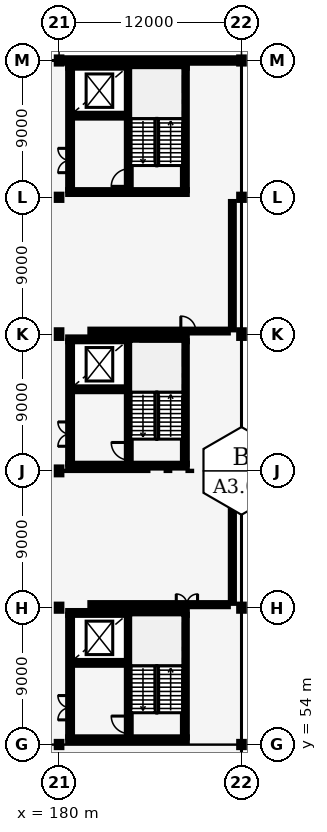
"""IFC4 building model, lengths in metres.
Left out: names, types, materials, properties, quantities, classifications, styles, units other than length and angle.
Written with IfcOpenShell. Run it as: python <this file> out.ifc"""

import sys

from ifc_helpers import new_model, si_unit, direction, frame, frame_2d, origin, origin_2d, place, context, subcontext, project, spatial, rectangle, i_section, extrude, element, fill, save


model = new_model("IFC4")
c1 = context("Model", 3, precision=1e-05, world=origin(), true_north=direction((0.0, 1.0)))
c2 = subcontext(c1, "Body", "Model", "MODEL_VIEW")
j1 = project(units=[si_unit("LENGTHUNIT", "METRE"), si_unit("PLANEANGLEUNIT", "RADIAN")], contexts=[c1])
p1 = place(None, origin())
s1 = spatial("IfcSite", under=j1, at=p1, CompositionType="ELEMENT")
p2 = place(p1, origin())
s2 = spatial("IfcBuilding", under=s1, at=p2, CompositionType="ELEMENT")
p3 = place(p2, frame((0.0, 0.0, 22.8)))
s3 = spatial("IfcBuildingStorey", under=s2, at=p3, CompositionType="ELEMENT", Elevation=22.8)
p4 = place(p3, frame((180.0, 54.0, 0.0), z_axis=(0.0, 0.0, 1.0), x_axis=(1.0, 0.0, 0.0)))
e1 = element("IfcColumn", 1, at=p4, inside=s3, PredefinedType="COLUMN", context=c2, shape_type="SweptSolid", body=[
    extrude(i_section(OverallWidth=0.3, OverallDepth=0.34, WebThickness=0.012, FlangeThickness=0.021, FilletRadius=0.027, at=origin_2d()), origin(), (0.0, 0.0, 1.0), 4.0),
])
p5 = place(p3, frame((180.0, 63.0, 0.0), z_axis=(0.0, 0.0, 1.0), x_axis=(1.0, 0.0, 0.0)))
e2 = element("IfcColumn", 2, at=p5, inside=s3, PredefinedType="COLUMN", context=c2, shape_type="SweptSolid", body=[
    extrude(i_section(OverallWidth=0.3, OverallDepth=0.4, WebThickness=0.013, FlangeThickness=0.024, FilletRadius=0.027, at=origin_2d()), origin(), (0.0, 0.0, 1.0), 4.0),
])
p6 = place(p3, frame((180.0, 72.0, 0.0), z_axis=(0.0, 0.0, 1.0), x_axis=(1.0, 0.0, 0.0)))
e3 = element("IfcColumn", 3, at=p6, inside=s3, PredefinedType="COLUMN", context=c2, shape_type="SweptSolid", body=[
    extrude(i_section(OverallWidth=0.3, OverallDepth=0.45, WebThickness=0.014, FlangeThickness=0.026, FilletRadius=0.027, at=origin_2d()), origin(), (0.0, 0.0, 1.0), 4.0),
])
p7 = place(p3, frame((180.0, 81.0, 0.0), z_axis=(0.0, 0.0, 1.0), x_axis=(1.0, 0.0, 0.0)))
e4 = element("IfcColumn", 4, at=p7, inside=s3, PredefinedType="COLUMN", context=c2, shape_type="SweptSolid", body=[
    extrude(i_section(OverallWidth=0.3, OverallDepth=0.5, WebThickness=0.014, FlangeThickness=0.028, FilletRadius=0.027, at=origin_2d()), origin(), (0.0, 0.0, 1.0), 4.0),
])
p8 = place(p3, frame((180.0, 90.0, 0.0), z_axis=(0.0, 0.0, 1.0), x_axis=(1.0, 0.0, 0.0)))
e5 = element("IfcColumn", 5, at=p8, inside=s3, PredefinedType="COLUMN", context=c2, shape_type="SweptSolid", body=[
    extrude(i_section(OverallWidth=0.3, OverallDepth=0.34, WebThickness=0.012, FlangeThickness=0.021, FilletRadius=0.027, at=origin_2d()), origin(), (0.0, 0.0, 1.0), 4.0),
])
p9 = place(p3, frame((180.0, 99.0, 0.0), z_axis=(0.0, 0.0, 1.0), x_axis=(1.0, 0.0, 0.0)))
e6 = element("IfcColumn", 6, at=p9, inside=s3, PredefinedType="COLUMN", context=c2, shape_type="SweptSolid", body=[
    extrude(i_section(OverallWidth=0.3, OverallDepth=0.4, WebThickness=0.013, FlangeThickness=0.024, FilletRadius=0.027, at=origin_2d()), origin(), (0.0, 0.0, 1.0), 4.0),
])
p10 = place(p3, frame((192.0, 54.0, 0.0), z_axis=(0.0, 0.0, 1.0), x_axis=(1.0, 0.0, 0.0)))
e7 = element("IfcColumn", 7, at=p10, inside=s3, PredefinedType="COLUMN", context=c2, shape_type="SweptSolid", body=[
    extrude(i_section(OverallWidth=0.3, OverallDepth=0.34, WebThickness=0.012, FlangeThickness=0.021, FilletRadius=0.027, at=origin_2d()), origin(), (0.0, 0.0, 1.0), 4.0),
])
p11 = place(p3, frame((192.0, 63.0, 0.0), z_axis=(0.0, 0.0, 1.0), x_axis=(1.0, 0.0, 0.0)))
e8 = element("IfcColumn", 8, at=p11, inside=s3, PredefinedType="COLUMN", context=c2, shape_type="SweptSolid", body=[
    extrude(i_section(OverallWidth=0.3, OverallDepth=0.4, WebThickness=0.013, FlangeThickness=0.024, FilletRadius=0.027, at=origin_2d()), origin(), (0.0, 0.0, 1.0), 4.0),
])
p12 = place(p3, frame((192.0, 72.0, 0.0), z_axis=(0.0, 0.0, 1.0), x_axis=(1.0, 0.0, 0.0)))
e9 = element("IfcColumn", 9, at=p12, inside=s3, PredefinedType="COLUMN", context=c2, shape_type="SweptSolid", body=[
    extrude(i_section(OverallWidth=0.3, OverallDepth=0.45, WebThickness=0.014, FlangeThickness=0.026, FilletRadius=0.027, at=origin_2d()), origin(), (0.0, 0.0, 1.0), 4.0),
])
p13 = place(p3, frame((192.0, 81.0, 0.0), z_axis=(0.0, 0.0, 1.0), x_axis=(1.0, 0.0, 0.0)))
e10 = element("IfcColumn", 10, at=p13, inside=s3, PredefinedType="COLUMN", context=c2, shape_type="SweptSolid", body=[
    extrude(i_section(OverallWidth=0.3, OverallDepth=0.5, WebThickness=0.014, FlangeThickness=0.028, FilletRadius=0.027, at=origin_2d()), origin(), (0.0, 0.0, 1.0), 4.0),
])
p14 = place(p3, frame((192.0, 90.0, 0.0), z_axis=(0.0, 0.0, 1.0), x_axis=(1.0, 0.0, 0.0)))
e11 = element("IfcColumn", 11, at=p14, inside=s3, PredefinedType="COLUMN", context=c2, shape_type="SweptSolid", body=[
    extrude(i_section(OverallWidth=0.3, OverallDepth=0.34, WebThickness=0.012, FlangeThickness=0.021, FilletRadius=0.027, at=origin_2d()), origin(), (0.0, 0.0, 1.0), 4.0),
])
p15 = place(p3, frame((192.0, 99.0, 0.0), z_axis=(0.0, 0.0, 1.0), x_axis=(1.0, 0.0, 0.0)))
e12 = element("IfcColumn", 12, at=p15, inside=s3, PredefinedType="COLUMN", context=c2, shape_type="SweptSolid", body=[
    extrude(i_section(OverallWidth=0.3, OverallDepth=0.4, WebThickness=0.013, FlangeThickness=0.024, FilletRadius=0.027, at=origin_2d()), origin(), (0.0, 0.0, 1.0), 4.0),
])
p16 = place(p3, frame((180.145, 99.0, 0.0), z_axis=(0.0, 0.0, 1.0), x_axis=(1.0, 0.0, 0.0)))
e13 = element("IfcWall", 13, at=p16, inside=s3, PredefinedType="SOLIDWALL", context=c2, shape_type="SweptSolid", body=[
    extrude(rectangle(XDim=11.71, YDim=0.29, at=frame_2d((5.855, 0.0))), origin(), (0.0, 0.0, 1.0), 2.85),
])
p17 = place(p3, frame((180.725, 54.47, 0.0), z_axis=(0.0, 0.0, 1.0), x_axis=(0.0, 1.0, 0.0)))
e14 = element("IfcWall", 14, at=p17, inside=s3, PredefinedType="SHEAR", context=c2, shape_type="SweptSolid", body=[
    extrude(rectangle(XDim=8.06, YDim=0.25, at=frame_2d((4.03, 0.0))), origin(), (0.0, 0.0, 1.0), 3.64),
])
p18 = place(p17, frame((1.15, 0.0, 0.0)))
e15 = element("IfcOpeningElement", 15, at=p18, cuts=e14, PredefinedType="OPENING", context=c2, shape_type="SweptSolid", body=[
    extrude(rectangle(XDim=1.6, YDim=2.2, at=frame_2d((0.8, 1.1))), frame((0.0, 0.135, 0.0), z_axis=(0.0, -1.0, 0.0), x_axis=(1.0, 0.0, 0.0)), (0.0, 0.0, 1.0), 0.27),
])
p19 = place(p3, frame((188.275, 54.47, 0.0), z_axis=(0.0, 0.0, 1.0), x_axis=(0.0, 1.0, 0.0)))
e16 = element("IfcWall", 16, at=p19, inside=s3, PredefinedType="SHEAR", context=c2, shape_type="SweptSolid", body=[
    extrude(rectangle(XDim=8.06, YDim=0.25, at=frame_2d((4.03, 0.0))), origin(), (0.0, 0.0, 1.0), 3.64),
])
for number, where, z_axis, x_axis in (
    (17, (180.6, 54.345, 0.0), (0.0, 0.0, 1.0), (1.0, 0.0, 0.0)),
    (18, (180.6, 62.655, 0.0), (0.0, 0.0, 1.0), (1.0, 0.0, 0.0)),
):
    element("IfcWall", number, at=place(p3, frame(where, z_axis=z_axis, x_axis=x_axis)), inside=s3, PredefinedType="SHEAR", context=c2, shape_type="SweptSolid", body=[
        extrude(rectangle(XDim=7.8, YDim=0.25, at=frame_2d((3.9, 0.0))), origin(), (0.0, 0.0, 1.0), 3.64),
    ])
p20 = place(p3, frame((184.585, 54.47, 0.0), z_axis=(0.0, 0.0, 1.0), x_axis=(0.0, 1.0, 0.0)))
e19 = element("IfcWall", 19, at=p20, inside=s3, PredefinedType="SHEAR", context=c2, shape_type="SweptSolid", body=[
    extrude(rectangle(XDim=8.06, YDim=0.25, at=frame_2d((4.03, 0.0))), origin(), (0.0, 0.0, 1.0), 3.64),
])
p21 = place(p20, frame((0.25, 0.0, 0.0)))
e20 = element("IfcOpeningElement", 20, at=p21, cuts=e19, PredefinedType="OPENING", context=c2, shape_type="SweptSolid", body=[
    extrude(rectangle(XDim=1.15, YDim=2.15, at=frame_2d((0.575, 1.075))), frame((0.0, 0.135, 0.0), z_axis=(0.0, -1.0, 0.0), x_axis=(1.0, 0.0, 0.0)), (0.0, 0.0, 1.0), 0.27),
])
p22 = place(p3, frame((180.85, 59.37, 0.0), z_axis=(0.0, 0.0, 1.0), x_axis=(1.0, 0.0, 0.0)))
e21 = element("IfcWall", 21, at=p22, inside=s3, PredefinedType="SHEAR", context=c2, shape_type="SweptSolid", body=[
    extrude(rectangle(XDim=3.61, YDim=0.25, at=frame_2d((1.805, 0.0))), origin(), (0.0, 0.0, 1.0), 3.64),
])
p23 = place(p22, frame((0.95, 0.0, 0.0)))
e22 = element("IfcOpeningElement", 22, at=p23, cuts=e21, PredefinedType="OPENING", context=c2, shape_type="SweptSolid", body=[
    extrude(rectangle(XDim=1.2, YDim=2.2, at=frame_2d((0.6, 1.1))), frame((0.0, 0.135, 0.0), z_axis=(0.0, -1.0, 0.0), x_axis=(1.0, 0.0, 0.0)), (0.0, 0.0, 1.0), 0.27),
])
p24 = place(p3, frame((180.725, 72.47, 0.0), z_axis=(0.0, 0.0, 1.0), x_axis=(0.0, 1.0, 0.0)))
e23 = element("IfcWall", 23, at=p24, inside=s3, PredefinedType="SHEAR", context=c2, shape_type="SweptSolid", body=[
    extrude(rectangle(XDim=8.06, YDim=0.25, at=frame_2d((4.03, 0.0))), origin(), (0.0, 0.0, 1.0), 3.64),
])
p25 = place(p24, frame((1.15, 0.0, 0.0)))
e24 = element("IfcOpeningElement", 24, at=p25, cuts=e23, PredefinedType="OPENING", context=c2, shape_type="SweptSolid", body=[
    extrude(rectangle(XDim=1.6, YDim=2.2, at=frame_2d((0.8, 1.1))), frame((0.0, 0.135, 0.0), z_axis=(0.0, -1.0, 0.0), x_axis=(1.0, 0.0, 0.0)), (0.0, 0.0, 1.0), 0.27),
])
p26 = place(p3, frame((188.275, 72.47, 0.0), z_axis=(0.0, 0.0, 1.0), x_axis=(0.0, 1.0, 0.0)))
e25 = element("IfcWall", 25, at=p26, inside=s3, PredefinedType="SHEAR", context=c2, shape_type="SweptSolid", body=[
    extrude(rectangle(XDim=8.06, YDim=0.25, at=frame_2d((4.03, 0.0))), origin(), (0.0, 0.0, 1.0), 3.64),
])
for number, where, z_axis, x_axis in (
    (26, (180.6, 72.345, 0.0), (0.0, 0.0, 1.0), (1.0, 0.0, 0.0)),
    (27, (180.6, 80.655, 0.0), (0.0, 0.0, 1.0), (1.0, 0.0, 0.0)),
):
    element("IfcWall", number, at=place(p3, frame(where, z_axis=z_axis, x_axis=x_axis)), inside=s3, PredefinedType="SHEAR", context=c2, shape_type="SweptSolid", body=[
        extrude(rectangle(XDim=7.8, YDim=0.25, at=frame_2d((3.9, 0.0))), origin(), (0.0, 0.0, 1.0), 3.64),
    ])
p27 = place(p3, frame((184.585, 72.47, 0.0), z_axis=(0.0, 0.0, 1.0), x_axis=(0.0, 1.0, 0.0)))
e28 = element("IfcWall", 28, at=p27, inside=s3, PredefinedType="SHEAR", context=c2, shape_type="SweptSolid", body=[
    extrude(rectangle(XDim=8.06, YDim=0.25, at=frame_2d((4.03, 0.0))), origin(), (0.0, 0.0, 1.0), 3.64),
])
p28 = place(p27, frame((0.25, 0.0, 0.0)))
e29 = element("IfcOpeningElement", 29, at=p28, cuts=e28, PredefinedType="OPENING", context=c2, shape_type="SweptSolid", body=[
    extrude(rectangle(XDim=1.15, YDim=2.15, at=frame_2d((0.575, 1.075))), frame((0.0, 0.135, 0.0), z_axis=(0.0, -1.0, 0.0), x_axis=(1.0, 0.0, 0.0)), (0.0, 0.0, 1.0), 0.27),
])
p29 = place(p3, frame((180.85, 77.37, 0.0), z_axis=(0.0, 0.0, 1.0), x_axis=(1.0, 0.0, 0.0)))
e30 = element("IfcWall", 30, at=p29, inside=s3, PredefinedType="SHEAR", context=c2, shape_type="SweptSolid", body=[
    extrude(rectangle(XDim=3.61, YDim=0.25, at=frame_2d((1.805, 0.0))), origin(), (0.0, 0.0, 1.0), 3.64),
])
p30 = place(p29, frame((0.95, 0.0, 0.0)))
e31 = element("IfcOpeningElement", 31, at=p30, cuts=e30, PredefinedType="OPENING", context=c2, shape_type="SweptSolid", body=[
    extrude(rectangle(XDim=1.2, YDim=2.2, at=frame_2d((0.6, 1.1))), frame((0.0, 0.135, 0.0), z_axis=(0.0, -1.0, 0.0), x_axis=(1.0, 0.0, 0.0)), (0.0, 0.0, 1.0), 0.27),
])
p31 = place(p3, frame((180.725, 90.47, 0.0), z_axis=(0.0, 0.0, 1.0), x_axis=(0.0, 1.0, 0.0)))
e32 = element("IfcWall", 32, at=p31, inside=s3, PredefinedType="SHEAR", context=c2, shape_type="SweptSolid", body=[
    extrude(rectangle(XDim=8.06, YDim=0.25, at=frame_2d((4.03, 0.0))), origin(), (0.0, 0.0, 1.0), 3.64),
])
p32 = place(p31, frame((1.15, 0.0, 0.0)))
e33 = element("IfcOpeningElement", 33, at=p32, cuts=e32, PredefinedType="OPENING", context=c2, shape_type="SweptSolid", body=[
    extrude(rectangle(XDim=1.6, YDim=2.2, at=frame_2d((0.8, 1.1))), frame((0.0, 0.135, 0.0), z_axis=(0.0, -1.0, 0.0), x_axis=(1.0, 0.0, 0.0)), (0.0, 0.0, 1.0), 0.27),
])
p33 = place(p3, frame((188.275, 90.47, 0.0), z_axis=(0.0, 0.0, 1.0), x_axis=(0.0, 1.0, 0.0)))
e34 = element("IfcWall", 34, at=p33, inside=s3, PredefinedType="SHEAR", context=c2, shape_type="SweptSolid", body=[
    extrude(rectangle(XDim=8.06, YDim=0.25, at=frame_2d((4.03, 0.0))), origin(), (0.0, 0.0, 1.0), 3.64),
])
for number, where, z_axis, x_axis in (
    (35, (180.6, 90.345, 0.0), (0.0, 0.0, 1.0), (1.0, 0.0, 0.0)),
    (36, (180.6, 98.655, 0.0), (0.0, 0.0, 1.0), (1.0, 0.0, 0.0)),
):
    element("IfcWall", number, at=place(p3, frame(where, z_axis=z_axis, x_axis=x_axis)), inside=s3, PredefinedType="SHEAR", context=c2, shape_type="SweptSolid", body=[
        extrude(rectangle(XDim=7.8, YDim=0.25, at=frame_2d((3.9, 0.0))), origin(), (0.0, 0.0, 1.0), 3.64),
    ])
p34 = place(p3, frame((184.585, 90.47, 0.0), z_axis=(0.0, 0.0, 1.0), x_axis=(0.0, 1.0, 0.0)))
e37 = element("IfcWall", 37, at=p34, inside=s3, PredefinedType="SHEAR", context=c2, shape_type="SweptSolid", body=[
    extrude(rectangle(XDim=8.06, YDim=0.25, at=frame_2d((4.03, 0.0))), origin(), (0.0, 0.0, 1.0), 3.64),
])
p35 = place(p34, frame((0.25, 0.0, 0.0)))
e38 = element("IfcOpeningElement", 38, at=p35, cuts=e37, PredefinedType="OPENING", context=c2, shape_type="SweptSolid", body=[
    extrude(rectangle(XDim=1.15, YDim=2.15, at=frame_2d((0.575, 1.075))), frame((0.0, 0.135, 0.0), z_axis=(0.0, -1.0, 0.0), x_axis=(1.0, 0.0, 0.0)), (0.0, 0.0, 1.0), 0.27),
])
p36 = place(p3, frame((180.85, 95.37, 0.0), z_axis=(0.0, 0.0, 1.0), x_axis=(1.0, 0.0, 0.0)))
e39 = element("IfcWall", 39, at=p36, inside=s3, PredefinedType="SHEAR", context=c2, shape_type="SweptSolid", body=[
    extrude(rectangle(XDim=3.61, YDim=0.25, at=frame_2d((1.805, 0.0))), origin(), (0.0, 0.0, 1.0), 3.64),
])
p37 = place(p36, frame((0.95, 0.0, 0.0)))
e40 = element("IfcOpeningElement", 40, at=p37, cuts=e39, PredefinedType="OPENING", context=c2, shape_type="SweptSolid", body=[
    extrude(rectangle(XDim=1.2, YDim=2.2, at=frame_2d((0.6, 1.1))), frame((0.0, 0.135, 0.0), z_axis=(0.0, -1.0, 0.0), x_axis=(1.0, 0.0, 0.0)), (0.0, 0.0, 1.0), 0.27),
])
p38 = place(p3, frame((182.06, 63.2, 0.0), z_axis=(0.0, 0.0, 1.0), x_axis=(1.0, 0.0, 0.0)))
e41 = element("IfcWall", 41, at=p38, inside=s3, PredefinedType="SOLIDWALL", context=c2, shape_type="SweptSolid", body=[
    extrude(rectangle(XDim=9.04, YDim=0.2, at=frame_2d((4.52, 0.0))), origin(), (0.0, 0.0, 1.0), 2.8),
])
p39 = place(p38, frame((5.65, 0.0, 0.0)))
e42 = element("IfcOpeningElement", 42, at=p39, cuts=e41, PredefinedType="OPENING", context=c2, shape_type="SweptSolid", body=[
    extrude(rectangle(XDim=1.4, YDim=2.25, at=frame_2d((0.7, 1.125))), frame((0.0, 0.11, 0.0), z_axis=(0.0, -1.0, 0.0), x_axis=(1.0, 0.0, 0.0)), (0.0, 0.0, 1.0), 0.22),
])
p40 = place(p3, frame((191.4, 63.32, 0.0), z_axis=(0.0, 0.0, 1.0), x_axis=(0.0, 1.0, 0.0)))
e43 = element("IfcWall", 43, at=p40, inside=s3, PredefinedType="SOLIDWALL", context=c2, shape_type="SweptSolid", body=[
    extrude(rectangle(XDim=8.36, YDim=0.2, at=frame_2d((4.18, 0.0))), origin(), (0.0, 0.0, 1.0), 2.8),
])
p41 = place(p3, frame((182.06, 81.2, 0.0), z_axis=(0.0, 0.0, 1.0), x_axis=(1.0, 0.0, 0.0)))
e44 = element("IfcWall", 44, at=p41, inside=s3, PredefinedType="PARTITIONING", context=c2, shape_type="SweptSolid", body=[
    extrude(rectangle(XDim=9.04, YDim=0.185, at=frame_2d((4.52, 0.0))), origin(), (0.0, 0.0, 1.0), 2.8),
])
p42 = place(p41, frame((5.95, 0.0, 0.0)))
e45 = element("IfcOpeningElement", 45, at=p42, cuts=e44, PredefinedType="OPENING", context=c2, shape_type="SweptSolid", body=[
    extrude(rectangle(XDim=0.98, YDim=2.12, at=frame_2d((0.49, 1.06))), frame((0.0, 0.103, 0.0), z_axis=(0.0, -1.0, 0.0), x_axis=(1.0, 0.0, 0.0)), (0.0, 0.0, 1.0), 0.205),
])
p43 = place(p3, frame((191.4, 81.311, 0.0), z_axis=(0.0, 0.0, 1.0), x_axis=(0.0, 1.0, 0.0)))
e46 = element("IfcWall", 46, at=p43, inside=s3, PredefinedType="PARTITIONING", context=c2, shape_type="SweptSolid", body=[
    extrude(rectangle(XDim=8.378, YDim=0.185, at=frame_2d((4.189, 0.0))), origin(), (0.0, 0.0, 1.0), 2.8),
])
p44 = place(p21, origin())
e47 = element("IfcDoor", 47, at=p44, inside=s3, OperationType="SINGLE_SWING_RIGHT", PredefinedType="DOOR", context=c2, shape_type="SweptSolid", body=[
    extrude(rectangle(XDim=1.15, YDim=2.15, at=frame_2d((0.575, 1.075))), frame((0.0, 0.025, 0.0), z_axis=(0.0, -1.0, 0.0), x_axis=(1.0, 0.0, 0.0)), (0.0, 0.0, 1.0), 0.05),
])
fill(e20, e47)
p45 = place(p23, origin())
e48 = element("IfcDoor", 48, at=p45, inside=s3, OperationType="DOUBLE_DOOR_SLIDING", PredefinedType="DOOR", context=c2, shape_type="SweptSolid", body=[
    extrude(rectangle(XDim=1.2, YDim=2.2, at=frame_2d((0.6, 1.1))), frame((0.0, 0.025, 0.0), z_axis=(0.0, -1.0, 0.0), x_axis=(1.0, 0.0, 0.0)), (0.0, 0.0, 1.0), 0.05),
])
fill(e22, e48)
p46 = place(p18, origin())
e49 = element("IfcDoor", 49, at=p46, inside=s3, OperationType="DOUBLE_DOOR_SINGLE_SWING", PredefinedType="DOOR", context=c2, shape_type="SweptSolid", body=[
    extrude(rectangle(XDim=1.6, YDim=2.2, at=frame_2d((0.8, 1.1))), frame((0.0, 0.025, 0.0), z_axis=(0.0, -1.0, 0.0), x_axis=(1.0, 0.0, 0.0)), (0.0, 0.0, 1.0), 0.05),
])
fill(e15, e49)
p47 = place(p28, origin())
e50 = element("IfcDoor", 50, at=p47, inside=s3, OperationType="SINGLE_SWING_RIGHT", PredefinedType="DOOR", context=c2, shape_type="SweptSolid", body=[
    extrude(rectangle(XDim=1.15, YDim=2.15, at=frame_2d((0.575, 1.075))), frame((0.0, 0.025, 0.0), z_axis=(0.0, -1.0, 0.0), x_axis=(1.0, 0.0, 0.0)), (0.0, 0.0, 1.0), 0.05),
])
fill(e29, e50)
p48 = place(p30, origin())
e51 = element("IfcDoor", 51, at=p48, inside=s3, OperationType="DOUBLE_DOOR_SLIDING", PredefinedType="DOOR", context=c2, shape_type="SweptSolid", body=[
    extrude(rectangle(XDim=1.2, YDim=2.2, at=frame_2d((0.6, 1.1))), frame((0.0, 0.025, 0.0), z_axis=(0.0, -1.0, 0.0), x_axis=(1.0, 0.0, 0.0)), (0.0, 0.0, 1.0), 0.05),
])
fill(e31, e51)
p49 = place(p25, origin())
e52 = element("IfcDoor", 52, at=p49, inside=s3, OperationType="DOUBLE_DOOR_SINGLE_SWING", PredefinedType="DOOR", context=c2, shape_type="SweptSolid", body=[
    extrude(rectangle(XDim=1.6, YDim=2.2, at=frame_2d((0.8, 1.1))), frame((0.0, 0.025, 0.0), z_axis=(0.0, -1.0, 0.0), x_axis=(1.0, 0.0, 0.0)), (0.0, 0.0, 1.0), 0.05),
])
fill(e24, e52)
p50 = place(p35, origin())
e53 = element("IfcDoor", 53, at=p50, inside=s3, OperationType="SINGLE_SWING_LEFT", PredefinedType="DOOR", context=c2, shape_type="SweptSolid", body=[
    extrude(rectangle(XDim=1.15, YDim=2.15, at=frame_2d((0.575, 1.075))), frame((0.0, 0.025, 0.0), z_axis=(0.0, -1.0, 0.0), x_axis=(1.0, 0.0, 0.0)), (0.0, 0.0, 1.0), 0.05),
])
fill(e38, e53)
p51 = place(p37, origin())
e54 = element("IfcDoor", 54, at=p51, inside=s3, OperationType="DOUBLE_DOOR_SLIDING", PredefinedType="DOOR", context=c2, shape_type="SweptSolid", body=[
    extrude(rectangle(XDim=1.2, YDim=2.2, at=frame_2d((0.6, 1.1))), frame((0.0, 0.025, 0.0), z_axis=(0.0, -1.0, 0.0), x_axis=(1.0, 0.0, 0.0)), (0.0, 0.0, 1.0), 0.05),
])
fill(e40, e54)
p52 = place(p32, origin())
e55 = element("IfcDoor", 55, at=p52, inside=s3, OperationType="DOUBLE_DOOR_SINGLE_SWING", PredefinedType="DOOR", context=c2, shape_type="SweptSolid", body=[
    extrude(rectangle(XDim=1.6, YDim=2.2, at=frame_2d((0.8, 1.1))), frame((0.0, 0.025, 0.0), z_axis=(0.0, -1.0, 0.0), x_axis=(1.0, 0.0, 0.0)), (0.0, 0.0, 1.0), 0.05),
])
fill(e33, e55)
p53 = place(p39, origin())
e56 = element("IfcDoor", 56, at=p53, inside=s3, OperationType="DOUBLE_DOOR_SINGLE_SWING", PredefinedType="DOOR", context=c2, shape_type="SweptSolid", body=[
    extrude(rectangle(XDim=1.4, YDim=2.25, at=frame_2d((0.7, 1.125))), frame((0.0, 0.025, 0.0), z_axis=(0.0, -1.0, 0.0), x_axis=(1.0, 0.0, 0.0)), (0.0, 0.0, 1.0), 0.05),
])
fill(e42, e56)
p54 = place(p42, origin())
e57 = element("IfcDoor", 57, at=p54, inside=s3, OperationType="SINGLE_SWING_LEFT", PredefinedType="DOOR", context=c2, shape_type="SweptSolid", body=[
    extrude(rectangle(XDim=0.98, YDim=2.12, at=frame_2d((0.49, 1.06))), frame((0.0, 0.025, 0.0), z_axis=(0.0, -1.0, 0.0), x_axis=(1.0, 0.0, 0.0)), (0.0, 0.0, 1.0), 0.05),
])
fill(e45, e57)
save(model, sys.argv[1])
